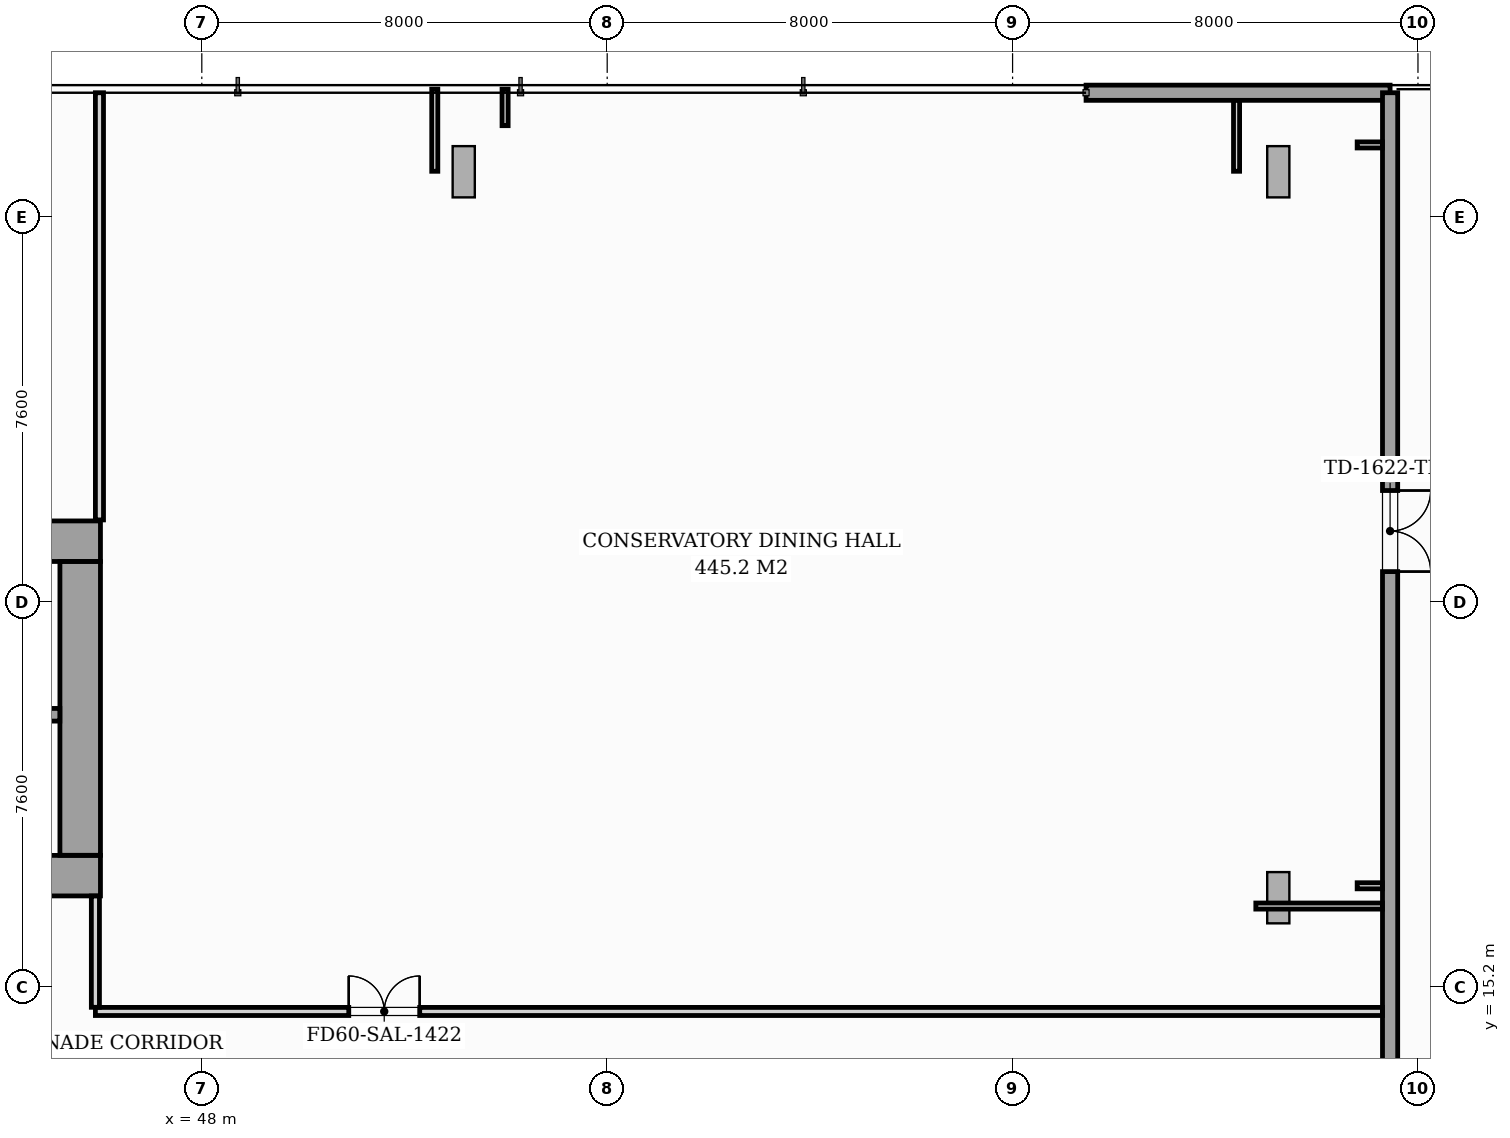
"""IFC4 building model, lengths in metres.
Left out: names, types, materials, properties, quantities, classifications, styles, units other than length and angle.
Written with IfcOpenShell. Run it as: python <this file> out.ifc"""

import sys

from ifc_helpers import new_model, si_unit, direction, frame, frame_2d, origin, origin_2d, place, context, subcontext, project, spatial, rectangle, i_section, extrude, source, transform, mapped, element, fill, save


model = new_model("IFC4")
c1 = context("Model", 3, precision=1e-05, world=origin(), true_north=direction((0.0, 1.0)))
c2 = subcontext(c1, "Body", "Model", "MODEL_VIEW")
j1 = project(units=[si_unit("LENGTHUNIT", "METRE"), si_unit("PLANEANGLEUNIT", "RADIAN")], contexts=[c1])
p1 = place(None, origin())
s1 = spatial("IfcSite", under=j1, at=p1, CompositionType="ELEMENT")
p2 = place(p1, origin())
s2 = spatial("IfcBuilding", under=s1, at=p2, CompositionType="ELEMENT")
p3 = place(p2, frame((0.0, 0.0, 14.0)))
s3 = spatial("IfcBuildingStorey", under=s2, at=p3, CompositionType="ELEMENT", Elevation=14.0)
m1 = source(origin(), c2, "Body", "SweptSolid", [
    extrude(i_section(OverallWidth=0.437, OverallDepth=0.514, WebThickness=0.061, FlangeThickness=0.097, FilletRadius=0.018, at=origin_2d()), origin(), (0.0, 0.0, 1.0), 4.496),
])
for number, where, z_axis, x_axis in (
    (1, (45.6, 17.4, 0.002), (0.0, 0.0, 1.0), (1.0, 0.0, 0.0)),
    (2, (45.6, 24.0, 0.002), (0.0, 0.0, 1.0), (1.0, 0.0, 0.0)),
):
    element("IfcColumn", number, at=place(p3, frame(where, z_axis=z_axis, x_axis=x_axis)), inside=s3, PredefinedType="PILASTER", context=c2, shape_type="MappedRepresentation", body=[
        mapped(m1, transform((0.0, 0.0, 0.0), scale=1.0)),
    ])
m2 = source(origin(), c2, "Body", "SweptSolid", [
    extrude(i_section(OverallWidth=0.438, OverallDepth=1.011, WebThickness=0.041, FlangeThickness=0.074, FilletRadius=0.024, at=origin_2d()), origin(), (0.0, 0.0, 1.0), 4.867),
])
p4 = place(p3, frame((53.883, 31.754, 0.15), z_axis=(-0.528345733155, -0.34269990021, 0.776793128608), x_axis=(0.651705470609, 0.42271449494, 0.629755853761)))
e3 = element("IfcColumn", 3, at=p4, inside=s3, PredefinedType="COLUMN", context=c2, shape_type="MappedRepresentation", body=[
    mapped(m2, transform((0.0, 0.0, 0.0), scale=1.0)),
])
m3 = source(origin(), c2, "Body", "SweptSolid", [
    extrude(i_section(OverallWidth=0.438, OverallDepth=1.011, WebThickness=0.041, FlangeThickness=0.074, FilletRadius=0.024, at=origin_2d()), origin(), (0.0, 0.0, 1.0), 5.485),
])
p5 = place(p3, frame((70.251, 31.744, 0.172), z_axis=(-0.667720931112, -0.30047886988, 0.681073569382), x_axis=(0.621084085241, 0.279491978367, 0.73221499103)))
e4 = element("IfcColumn", 4, at=p5, inside=s3, PredefinedType="COLUMN", context=c2, shape_type="MappedRepresentation", body=[
    mapped(m3, transform((0.0, 0.0, 0.0), scale=1.0)),
])
m4 = source(origin(), c2, "Body", "SweptSolid", [
    extrude(i_section(OverallWidth=0.438, OverallDepth=1.011, WebThickness=0.041, FlangeThickness=0.074, FilletRadius=0.024, at=origin_2d()), origin(), (0.0, 0.0, 1.0), 5.298),
])
p6 = place(p3, frame((70.257, 17.167, 0.167), z_axis=(-0.693307662759, -0.138652316712, 0.70717750235), x_axis=(0.693446365663, 0.138680055449, 0.707036052949)))
e5 = element("IfcColumn", 5, at=p6, inside=s3, PredefinedType="COLUMN", context=c2, shape_type="MappedRepresentation", body=[
    mapped(m4, transform((0.0, 0.0, 0.0), scale=1.0)),
])
p7 = place(p3, frame((65.45, 32.85, 0.0), z_axis=(0.0, 0.0, 1.0), x_axis=(1.0, 0.0, 0.0)))
e6 = element("IfcWall", 6, at=p7, inside=s3, PredefinedType="STANDARD", context=c2, shape_type="SweptSolid", body=[
    extrude(rectangle(XDim=6.0, YDim=0.3, at=frame_2d((3.0, 0.0))), origin(), (0.0, 0.0, 1.0), 4.08),
])
p8 = place(p3, frame((71.45, 32.85, 0.0), z_axis=(0.0, 0.0, 1.0), x_axis=(0.0, -1.0, 0.0)))
e7 = element("IfcWall", 7, at=p8, inside=s3, PredefinedType="STANDARD", context=c2, shape_type="SweptSolid", body=[
    extrude(rectangle(XDim=31.3, YDim=0.3, at=frame_2d((15.65, 0.0))), origin(), (0.0, 0.0, 1.0), 4.08),
])
p9 = place(p8, frame((7.85, 0.0, 0.0)))
e8 = element("IfcOpeningElement", 8, at=p9, cuts=e7, PredefinedType="OPENING", context=c2, shape_type="SweptSolid", body=[
    extrude(rectangle(XDim=1.6, YDim=2.1, at=frame_2d((0.8, 1.05))), frame((0.0, 0.16, 0.0), z_axis=(0.0, -1.0, 0.0), x_axis=(1.0, 0.0, 0.0)), (0.0, 0.0, 1.0), 0.32),
])
p10 = place(p8, frame((25.65, 0.0, 0.9)))
e9 = element("IfcOpeningElement", 9, at=p10, cuts=e7, PredefinedType="OPENING", context=c2, shape_type="SweptSolid", body=[
    extrude(rectangle(XDim=2.0, YDim=2.4, at=frame_2d((1.0, 1.2))), frame((0.0, 0.16, 0.0), z_axis=(0.0, -1.0, 0.0), x_axis=(1.0, 0.0, 0.0)), (0.0, 0.0, 1.0), 0.32),
])
p11 = place(p3, frame((26.0, 17.4, 0.0), z_axis=(0.0, 0.0, 1.0), x_axis=(1.0, 0.0, 0.0)))
e10 = element("IfcWall", 10, at=p11, inside=s3, PredefinedType="SHEAR", context=c2, shape_type="SweptSolid", body=[
    extrude(rectangle(XDim=20.0, YDim=0.8, at=frame_2d((10.0, 0.0))), origin(), (0.0, 0.0, 1.0), 4.5),
])
p12 = place(p11, frame((1.15, 0.0, 0.0)))
e11 = element("IfcOpeningElement", 11, at=p12, cuts=e10, PredefinedType="OPENING", context=c2, shape_type="SweptSolid", body=[
    extrude(rectangle(XDim=0.95, YDim=2.06, at=frame_2d((0.475, 1.03))), frame((0.0, 0.41, 0.0), z_axis=(0.0, -1.0, 0.0), x_axis=(1.0, 0.0, 0.0)), (0.0, 0.0, 1.0), 0.82),
])
p13 = place(p11, frame((9.58, 0.0, 0.0)))
e12 = element("IfcOpeningElement", 12, at=p13, cuts=e10, PredefinedType="OPENING", context=c2, shape_type="SweptSolid", body=[
    extrude(rectangle(XDim=0.9, YDim=2.06, at=frame_2d((0.45, 1.03))), frame((0.0, 0.41, 0.0), z_axis=(0.0, -1.0, 0.0), x_axis=(1.0, 0.0, 0.0)), (0.0, 0.0, 1.0), 0.82),
])
p14 = place(p11, frame((17.75, 0.0, 0.0)))
e13 = element("IfcOpeningElement", 13, at=p14, cuts=e10, PredefinedType="OPENING", context=c2, shape_type="SweptSolid", body=[
    extrude(rectangle(XDim=0.95, YDim=2.06, at=frame_2d((0.475, 1.03))), frame((0.0, 0.41, 0.0), z_axis=(0.0, -1.0, 0.0), x_axis=(1.0, 0.0, 0.0)), (0.0, 0.0, 1.0), 0.82),
])
p15 = place(p3, frame((26.0, 24.0, 0.0), z_axis=(0.0, 0.0, 1.0), x_axis=(1.0, 0.0, 0.0)))
e14 = element("IfcWall", 14, at=p15, inside=s3, PredefinedType="SHEAR", context=c2, shape_type="SweptSolid", body=[
    extrude(rectangle(XDim=20.0, YDim=0.8, at=frame_2d((10.0, 0.0))), origin(), (0.0, 0.0, 1.0), 4.5),
])
p16 = place(p3, frame((45.6, 17.802, 0.0), z_axis=(0.0, 0.0, 1.0), x_axis=(0.0, 1.0, 0.0)))
e15 = element("IfcWall", 15, at=p16, inside=s3, PredefinedType="SHEAR", context=c2, shape_type="SweptSolid", body=[
    extrude(rectangle(XDim=5.796, YDim=0.8, at=frame_2d((2.898, 0.0))), origin(), (0.0, 0.0, 1.0), 4.5),
])
p17 = place(p3, frame((37.05, 20.575, 0.0), z_axis=(0.0, 0.0, 1.0), x_axis=(1.0, 0.0, 0.0)))
e16 = element("IfcWall", 16, at=p17, inside=s3, PredefinedType="SOLIDWALL", context=c2, shape_type="SweptSolid", body=[
    extrude(rectangle(XDim=8.148, YDim=0.25, at=frame_2d((4.074, 0.0))), origin(), (0.0, 0.0, 1.0), 4.5),
])
p18 = place(p17, frame((6.6, 0.0, 0.0)))
e17 = element("IfcOpeningElement", 17, at=p18, cuts=e16, PredefinedType="OPENING", context=c2, shape_type="SweptSolid", body=[
    extrude(rectangle(XDim=0.95, YDim=2.06, at=frame_2d((0.475, 1.03))), frame((0.0, 0.135, 0.0), z_axis=(0.0, -1.0, 0.0), x_axis=(1.0, 0.0, 0.0)), (0.0, 0.0, 1.0), 0.27),
])
p19 = place(p3, frame((45.9, 14.72, 0.0), z_axis=(0.0, 0.0, 1.0), x_axis=(1.0, 0.0, 0.0)))
e18 = element("IfcWall", 18, at=p19, inside=s3, PredefinedType="PARTITIONING", context=c2, shape_type="SweptSolid", body=[
    extrude(rectangle(XDim=25.398, YDim=0.16, at=frame_2d((12.699, 0.0))), origin(), (0.0, 0.0, 1.0), 4.08),
])
p20 = place(p19, frame((5.0, 0.0, 0.0)))
e19 = element("IfcOpeningElement", 19, at=p20, cuts=e18, PredefinedType="OPENING", context=c2, shape_type="SweptSolid", body=[
    extrude(rectangle(XDim=1.4, YDim=2.08, at=frame_2d((0.7, 1.04))), frame((0.0, 0.09, 0.0), z_axis=(0.0, -1.0, 0.0), x_axis=(1.0, 0.0, 0.0)), (0.0, 0.0, 1.0), 0.18),
])
p21 = place(p3, frame((45.98, 24.42, 0.0), z_axis=(0.0, 0.0, 1.0), x_axis=(0.0, 1.0, 0.0)))
e20 = element("IfcWall", 20, at=p21, inside=s3, PredefinedType="PARTITIONING", context=c2, shape_type="SweptSolid", body=[
    extrude(rectangle(XDim=8.43, YDim=0.16, at=frame_2d((4.215, 0.0))), origin(), (0.0, 0.0, 1.0), 4.08),
])
p22 = place(p3, frame((45.9, 14.802, 0.0), z_axis=(0.0, 0.0, 1.0), x_axis=(0.0, 1.0, 0.0)))
e21 = element("IfcWall", 21, at=p22, inside=s3, PredefinedType="PARTITIONING", context=c2, shape_type="SweptSolid", body=[
    extrude(rectangle(XDim=2.196, YDim=0.16, at=frame_2d((1.098, 0.0))), origin(), (0.0, 0.0, 1.0), 4.08),
])
p23 = place(p3, frame((52.597, 31.3, 0.0), z_axis=(0.0, 0.0, 1.0), x_axis=(0.0, 1.0, 0.0)))
e22 = element("IfcWall", 22, at=p23, inside=s3, PredefinedType="PARTITIONING", context=c2, shape_type="SweptSolid", body=[
    extrude(rectangle(XDim=1.62, YDim=0.12, at=frame_2d((0.81, 0.0))), origin(), (0.0, 0.0, 1.0), 4.08),
])
p24 = place(p3, frame((68.42, 31.3, 0.0), z_axis=(0.0, 0.0, 1.0), x_axis=(0.0, 1.0, 0.0)))
e23 = element("IfcWall", 23, at=p24, inside=s3, PredefinedType="PARTITIONING", context=c2, shape_type="SweptSolid", body=[
    extrude(rectangle(XDim=1.398, YDim=0.12, at=frame_2d((0.699, 0.0))), origin(), (0.0, 0.0, 1.0), 4.08),
])
p25 = place(p3, frame((68.8, 16.8, 0.0), z_axis=(0.0, 0.0, 1.0), x_axis=(1.0, 0.0, 0.0)))
e24 = element("IfcWall", 24, at=p25, inside=s3, PredefinedType="PARTITIONING", context=c2, shape_type="SweptSolid", body=[
    extrude(rectangle(XDim=2.498, YDim=0.12, at=frame_2d((1.249, 0.0))), origin(), (0.0, 0.0, 1.0), 4.08),
])
p26 = place(p3, frame((53.985, 32.2, 0.0), z_axis=(0.0, 0.0, 1.0), x_axis=(0.0, 1.0, 0.0)))
e25 = element("IfcWall", 25, at=p26, inside=s3, PredefinedType="PARTITIONING", context=c2, shape_type="SweptSolid", body=[
    extrude(rectangle(XDim=0.72, YDim=0.12, at=frame_2d((0.36, 0.0))), origin(), (0.0, 0.0, 1.0), 4.08),
])
for number, where, z_axis, x_axis in (
    (26, (70.8, 31.82, 0.0), (0.0, 0.0, 1.0), (1.0, 0.0, 0.0)),
    (27, (70.8, 17.2, 0.0), (0.0, 0.0, 1.0), (1.0, 0.0, 0.0)),
):
    element("IfcWall", number, at=place(p3, frame(where, z_axis=z_axis, x_axis=x_axis)), inside=s3, PredefinedType="PARTITIONING", context=c2, shape_type="SweptSolid", body=[
        extrude(rectangle(XDim=0.498, YDim=0.12, at=frame_2d((0.249, 0.0))), origin(), (0.0, 0.0, 1.0), 4.08),
    ])
m5 = source(origin(), c2, "Body", "SweptSolid", [
    extrude(rectangle(XDim=1.6, YDim=2.1, at=frame_2d((0.8, 1.05))), frame((0.0, 0.025, 0.0), z_axis=(0.0, -1.0, 0.0), x_axis=(1.0, 0.0, 0.0)), (0.0, 0.0, 1.0), 0.05),
])
p27 = place(p9, origin())
e28 = element("IfcDoor", 28, at=p27, inside=s3, OperationType="DOUBLE_DOOR_SINGLE_SWING", PredefinedType="DOOR", context=c2, shape_type="MappedRepresentation", body=[
    mapped(m5, transform((0.0, 0.0, 0.0), scale=1.0)),
])
fill(e8, e28)
m6 = source(origin(), c2, "Body", "SweptSolid", [
    extrude(rectangle(XDim=1.4, YDim=2.08, at=frame_2d((0.7, 1.04))), frame((0.0, 0.025, 0.0), z_axis=(0.0, -1.0, 0.0), x_axis=(1.0, 0.0, 0.0)), (0.0, 0.0, 1.0), 0.05),
])
p28 = place(p20, origin())
e29 = element("IfcDoor", 29, at=p28, inside=s3, OperationType="DOUBLE_DOOR_SINGLE_SWING", PredefinedType="DOOR", context=c2, shape_type="MappedRepresentation", body=[
    mapped(m6, transform((0.0, 0.0, 0.0), scale=1.0)),
])
fill(e19, e29)
save(model, sys.argv[1])
